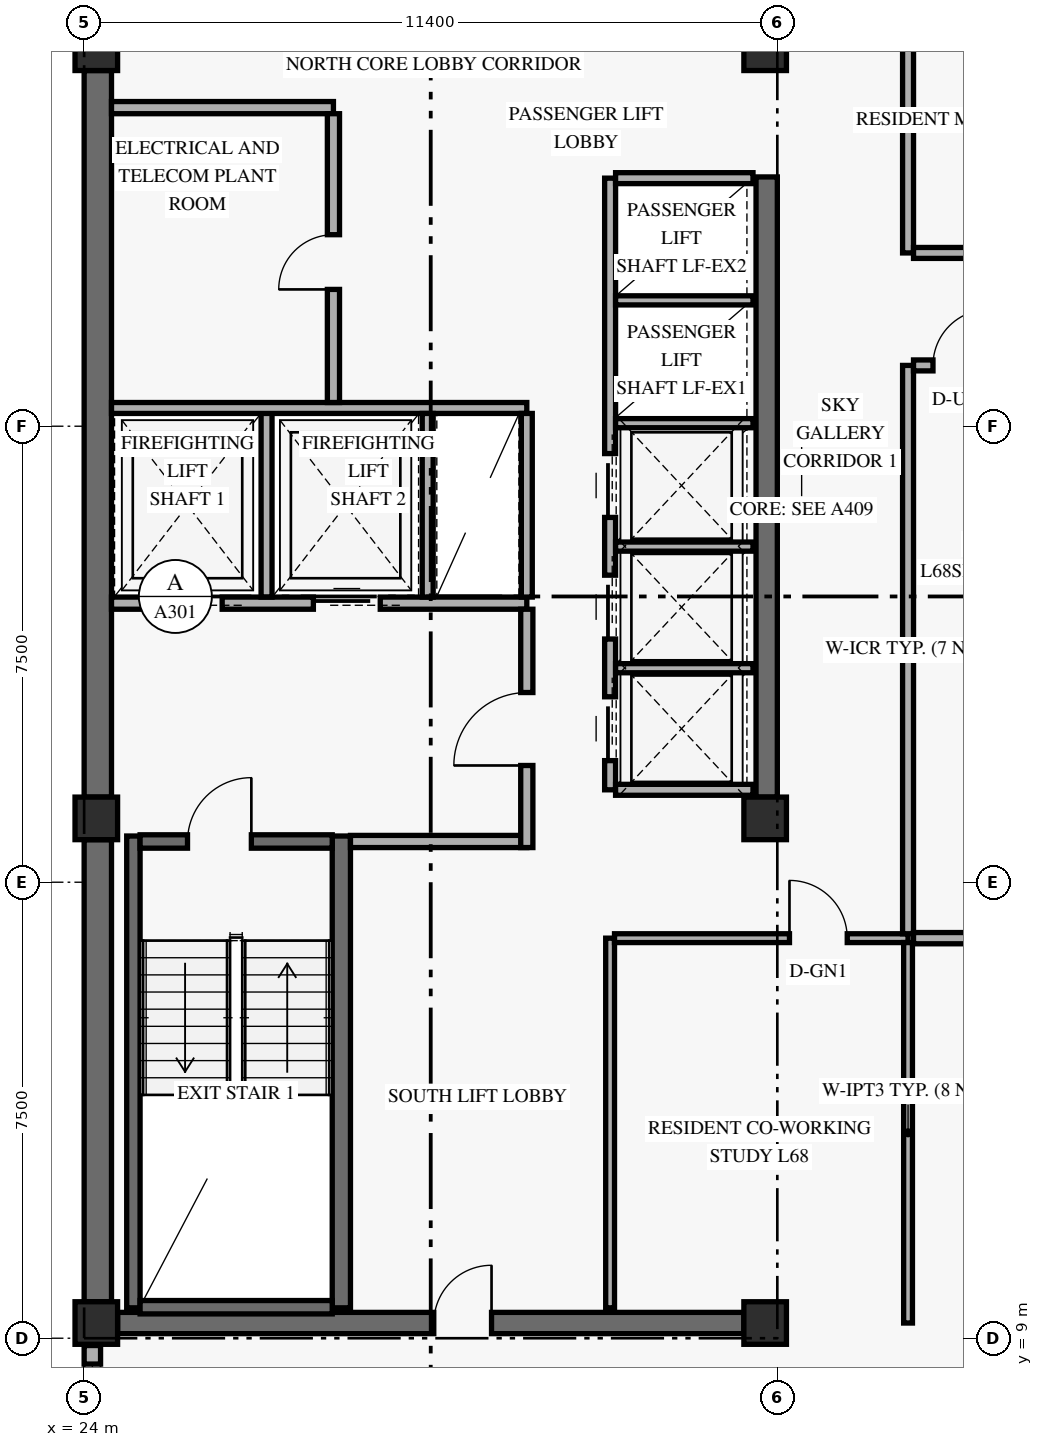
"""IFC4 building model, lengths in metres.
Left out: names, types, materials, properties, quantities, classifications, styles, units other than length and angle.
Written with IfcOpenShell. Run it as: python <this file> out.ifc"""

import sys

from ifc_helpers import new_model, si_unit, direction, frame, frame_2d, origin, origin_2d, place, context, subcontext, project, spatial, rectangle, extrude, element, fill, save


model = new_model("IFC4")
c1 = context("Model", 3, precision=1e-05, world=origin(), true_north=direction((0.0, 1.0)))
c2 = subcontext(c1, "Body", "Model", "MODEL_VIEW")
j1 = project(units=[si_unit("LENGTHUNIT", "METRE"), si_unit("PLANEANGLEUNIT", "RADIAN")], contexts=[c1])
p1 = place(None, origin())
s1 = spatial("IfcSite", under=j1, at=p1, CompositionType="ELEMENT")
p2 = place(p1, origin())
s2 = spatial("IfcBuilding", under=s1, at=p2, CompositionType="ELEMENT")
p3 = place(p2, frame((0.0, 0.0, 260.4)))
s3 = spatial("IfcBuildingStorey", under=s2, at=p3, CompositionType="ELEMENT", Elevation=260.4)
p4 = place(p3, frame((24.225, 9.6, 0.0), z_axis=(0.0, 0.0, 1.0), x_axis=(0.0, 1.0, 0.0)))
e1 = element("IfcWall", 1, at=p4, inside=s3, PredefinedType="SHEAR", context=c2, shape_type="SweptSolid", body=[
    extrude(rectangle(XDim=7.6, YDim=0.45, at=frame_2d((3.8, 0.0))), origin(), (0.0, 0.0, 1.0), 2.821),
])
p5 = place(p3, frame((24.225, 17.9, 0.0), z_axis=(0.0, 0.0, 1.0), x_axis=(0.0, 1.0, 0.0)))
e2 = element("IfcWall", 2, at=p5, inside=s3, PredefinedType="SHEAR", context=c2, shape_type="SweptSolid", body=[
    extrude(rectangle(XDim=11.95, YDim=0.45, at=frame_2d((5.975, 0.0))), origin(), (0.0, 0.0, 1.0), 2.821),
])
p6 = place(p3, frame((35.225, 17.9, 0.0), z_axis=(0.0, 0.0, 1.0), x_axis=(0.0, 1.0, 0.0)))
e3 = element("IfcWall", 3, at=p6, inside=s3, PredefinedType="SHEAR", context=c2, shape_type="SweptSolid", body=[
    extrude(rectangle(XDim=10.2, YDim=0.35, at=frame_2d((5.1, 0.0))), origin(), (0.0, 0.0, 1.0), 2.821),
])
p7 = place(p3, frame((24.55, 9.25, 0.0), z_axis=(0.0, 0.0, 1.0), x_axis=(1.0, 0.0, 0.0)))
e4 = element("IfcWall", 4, at=p7, inside=s3, PredefinedType="SHEAR", context=c2, shape_type="SweptSolid", body=[
    extrude(rectangle(XDim=10.3, YDim=0.35, at=frame_2d((5.15, 0.0))), origin(), (0.0, 0.0, 1.0), 3.36),
])
p8 = place(p7, frame((5.2, 0.0, 0.0)))
e5 = element("IfcOpeningElement", 5, at=p8, cuts=e4, PredefinedType="OPENING", context=c2, shape_type="SweptSolid", body=[
    extrude(rectangle(XDim=0.95, YDim=2.15, at=frame_2d((0.475, 1.075))), frame((0.0, 0.185, 0.0), z_axis=(0.0, -1.0, 0.0), x_axis=(1.0, 0.0, 0.0)), (0.0, 0.0, 1.0), 0.37),
])
p9 = place(p3, frame((24.81, 9.5, 0.0), z_axis=(0.0, 0.0, 1.0), x_axis=(0.0, 1.0, 0.0)))
e6 = element("IfcWall", 6, at=p9, inside=s3, PredefinedType="SHEAR", context=c2, shape_type="SweptSolid", body=[
    extrude(rectangle(XDim=7.76, YDim=0.22, at=frame_2d((3.88, 0.0))), origin(), (0.0, 0.0, 1.0), 3.36),
])
p10 = place(p3, frame((28.23, 9.5, 0.0), z_axis=(0.0, 0.0, 1.0), x_axis=(0.0, 1.0, 0.0)))
e7 = element("IfcWall", 7, at=p10, inside=s3, PredefinedType="SHEAR", context=c2, shape_type="SweptSolid", body=[
    extrude(rectangle(XDim=7.76, YDim=0.3, at=frame_2d((3.88, 0.0))), origin(), (0.0, 0.0, 1.0), 3.36),
])
p11 = place(p3, frame((24.92, 9.51, 0.0), z_axis=(0.0, 0.0, 1.0), x_axis=(1.0, 0.0, 0.0)))
e8 = element("IfcWall", 8, at=p11, inside=s3, PredefinedType="SHEAR", context=c2, shape_type="SweptSolid", body=[
    extrude(rectangle(XDim=3.16, YDim=0.22, at=frame_2d((1.58, 0.0))), origin(), (0.0, 0.0, 1.0), 3.36),
])
p12 = place(p3, frame((24.92, 17.17, 0.0), z_axis=(0.0, 0.0, 1.0), x_axis=(1.0, 0.0, 0.0)))
e9 = element("IfcWall", 9, at=p12, inside=s3, PredefinedType="SHEAR", context=c2, shape_type="SweptSolid", body=[
    extrude(rectangle(XDim=3.16, YDim=0.22, at=frame_2d((1.58, 0.0))), origin(), (0.0, 0.0, 1.0), 3.36),
])
p13 = place(p12, frame((0.78, 0.0, 0.0)))
e10 = element("IfcOpeningElement", 10, at=p13, cuts=e9, PredefinedType="OPENING", context=c2, shape_type="SweptSolid", body=[
    extrude(rectangle(XDim=1.05, YDim=2.15, at=frame_2d((0.525, 1.075))), frame((0.0, 0.12, 0.0), z_axis=(0.0, -1.0, 0.0), x_axis=(1.0, 0.0, 0.0)), (0.0, 0.0, 1.0), 0.24),
])
for number, where, z_axis, x_axis in (
    (11, (24.2, 9.25, 0.0), (0.0, 0.0, 1.0), (1.0, 0.0, 0.0)),
    (12, (24.2, 17.55, 0.0), (0.0, 0.0, 1.0), (1.0, 0.0, 0.0)),
    (13, (24.2, 30.2, 0.0), (0.0, 0.0, 1.0), (1.0, 0.0, 0.0)),
    (14, (35.2, 9.25, 0.0), (0.0, 0.0, 1.0), (1.0, 0.0, 0.0)),
    (15, (35.2, 17.55, 0.0), (0.0, 0.0, 1.0), (1.0, 0.0, 0.0)),
    (16, (35.2, 30.2, 0.0), (0.0, 0.0, 1.0), (1.0, 0.0, 0.0)),
):
    element("IfcColumn", number, at=place(p3, frame(where, z_axis=z_axis, x_axis=x_axis)), inside=s3, PredefinedType="COLUMN", context=c2, shape_type="SweptSolid", body=[
        extrude(rectangle(XDim=0.7, YDim=0.7, at=origin_2d()), origin(), (0.0, 0.0, 1.0), 3.6),
    ])
p14 = place(p3, frame((24.135, 7.32, 0.0), z_axis=(0.0, 0.0, 1.0), x_axis=(0.0, 1.0, 0.0)))
e17 = element("IfcWall", 17, at=p14, inside=s3, PredefinedType="SOLIDWALL", context=c2, shape_type="SweptSolid", body=[
    extrude(rectangle(XDim=1.56, YDim=0.27, at=frame_2d((0.78, 0.0))), origin(), (0.0, 0.0, 1.0), 2.803),
])
p15 = place(p14, frame((0.305, 0.0, 0.85)))
e18 = element("IfcOpeningElement", 18, at=p15, cuts=e17, PredefinedType="OPENING", context=c2, shape_type="SweptSolid", body=[
    extrude(rectangle(XDim=0.95, YDim=1.5, at=frame_2d((0.475, 0.75))), frame((0.0, 0.145, 0.0), z_axis=(0.0, -1.0, 0.0), x_axis=(1.0, 0.0, 0.0)), (0.0, 0.0, 1.0), 0.29),
])
p16 = place(p3, frame((24.45, 21.09, 0.0), z_axis=(0.0, 0.0, 1.0), x_axis=(1.0, 0.0, 0.0)))
e19 = element("IfcWall", 19, at=p16, inside=s3, PredefinedType="STANDARD", context=c2, shape_type="SweptSolid", body=[
    extrude(rectangle(XDim=6.83, YDim=0.2, at=frame_2d((3.415, 0.0))), origin(), (0.0, 0.0, 1.0), 3.36),
])
p17 = place(p16, frame((0.72, 0.0, 0.0)))
e20 = element("IfcOpeningElement", 20, at=p17, cuts=e19, PredefinedType="OPENING", context=c2, shape_type="SweptSolid", body=[
    extrude(rectangle(XDim=1.1, YDim=2.2, at=frame_2d((0.55, 1.1))), frame((0.0, 0.11, 0.0), z_axis=(0.0, -1.0, 0.0), x_axis=(1.0, 0.0, 0.0)), (0.0, 0.0, 1.0), 0.22),
])
p18 = place(p16, frame((3.32, 0.0, 0.0)))
e21 = element("IfcOpeningElement", 21, at=p18, cuts=e19, PredefinedType="OPENING", context=c2, shape_type="SweptSolid", body=[
    extrude(rectangle(XDim=1.1, YDim=2.2, at=frame_2d((0.55, 1.1))), frame((0.0, 0.11, 0.0), z_axis=(0.0, -1.0, 0.0), x_axis=(1.0, 0.0, 0.0)), (0.0, 0.0, 1.0), 0.22),
])
p19 = place(p3, frame((28.38, 17.17, 0.0), z_axis=(0.0, 0.0, 1.0), x_axis=(1.0, 0.0, 0.0)))
e22 = element("IfcWall", 22, at=p19, inside=s3, PredefinedType="STANDARD", context=c2, shape_type="SweptSolid", body=[
    extrude(rectangle(XDim=2.9, YDim=0.2, at=frame_2d((1.45, 0.0))), origin(), (0.0, 0.0, 1.0), 3.36),
])
p20 = place(p3, frame((31.28, 17.07, 0.0), z_axis=(0.0, 0.0, 1.0), x_axis=(0.0, 1.0, 0.0)))
e23 = element("IfcWall", 23, at=p20, inside=s3, PredefinedType="STANDARD", context=c2, shape_type="SweptSolid", body=[
    extrude(rectangle(XDim=3.92, YDim=0.2, at=frame_2d((1.96, 0.0))), origin(), (0.0, 0.0, 1.0), 2.803),
])
p21 = place(p20, frame((1.35, 0.0, 0.0)))
e24 = element("IfcOpeningElement", 24, at=p21, cuts=e23, PredefinedType="OPENING", context=c2, shape_type="SweptSolid", body=[
    extrude(rectangle(XDim=1.2, YDim=2.15, at=frame_2d((0.6, 1.075))), frame((0.0, 0.11, 0.0), z_axis=(0.0, -1.0, 0.0), x_axis=(1.0, 0.0, 0.0)), (0.0, 0.0, 1.0), 0.22),
])
p22 = place(p3, frame((27.0, 21.19, 0.0), z_axis=(0.0, 0.0, 1.0), x_axis=(0.0, 1.0, 0.0)))
e25 = element("IfcWall", 25, at=p22, inside=s3, PredefinedType="STANDARD", context=c2, shape_type="SweptSolid", body=[
    extrude(rectangle(XDim=3.11, YDim=0.18, at=frame_2d((1.555, 0.0))), origin(), (0.0, 0.0, 1.0), 3.36),
])
p23 = place(p3, frame((24.45, 24.3, 0.0), z_axis=(0.0, 0.0, 1.0), x_axis=(1.0, 0.0, 0.0)))
e26 = element("IfcWall", 26, at=p23, inside=s3, PredefinedType="STANDARD", context=c2, shape_type="SweptSolid", body=[
    extrude(rectangle(XDim=6.83, YDim=0.18, at=frame_2d((3.415, 0.0))), origin(), (0.0, 0.0, 1.0), 3.36),
])
for number, where, z_axis, x_axis in (
    (27, (29.65, 21.19, 0.0), (0.0, 0.0, 1.0), (0.0, 1.0, 0.0)),
    (28, (31.28, 21.19, 0.0), (0.0, 0.0, 1.0), (0.0, 1.0, 0.0)),
):
    element("IfcWall", number, at=place(p3, frame(where, z_axis=z_axis, x_axis=x_axis)), inside=s3, PredefinedType="STANDARD", context=c2, shape_type="SweptSolid", body=[
        extrude(rectangle(XDim=3.02, YDim=0.18, at=frame_2d((1.51, 0.0))), origin(), (0.0, 0.0, 1.0), 3.36),
    ])
p24 = place(p3, frame((24.45, 29.24, 0.0), z_axis=(0.0, 0.0, 1.0), x_axis=(1.0, 0.0, 0.0)))
e29 = element("IfcWall", 29, at=p24, inside=s3, PredefinedType="STANDARD", context=c2, shape_type="SweptSolid", body=[
    extrude(rectangle(XDim=3.65, YDim=0.2, at=frame_2d((1.825, 0.0))), origin(), (0.0, 0.0, 1.0), 3.36),
])
p25 = place(p3, frame((28.1, 24.39, 0.0), z_axis=(0.0, 0.0, 1.0), x_axis=(0.0, 1.0, 0.0)))
e30 = element("IfcWall", 30, at=p25, inside=s3, PredefinedType="STANDARD", context=c2, shape_type="SweptSolid", body=[
    extrude(rectangle(XDim=4.75, YDim=0.2, at=frame_2d((2.375, 0.0))), origin(), (0.0, 0.0, 1.0), 3.36),
])
p26 = place(p25, frame((1.86, 0.0, 0.0)))
e31 = element("IfcOpeningElement", 31, at=p26, cuts=e30, PredefinedType="OPENING", context=c2, shape_type="SweptSolid", body=[
    extrude(rectangle(XDim=0.9, YDim=2.1, at=frame_2d((0.45, 1.05))), frame((0.0, 0.11, 0.0), z_axis=(0.0, -1.0, 0.0), x_axis=(1.0, 0.0, 0.0)), (0.0, 0.0, 1.0), 0.22),
])
p27 = place(p3, frame((32.65, 18.02, 0.0), z_axis=(0.0, 0.0, 1.0), x_axis=(0.0, 1.0, 0.0)))
e32 = element("IfcWall", 32, at=p27, inside=s3, PredefinedType="STANDARD", context=c2, shape_type="SweptSolid", body=[
    extrude(rectangle(XDim=10.06, YDim=0.18, at=frame_2d((5.03, 0.0))), origin(), (0.0, 0.0, 1.0), 3.36),
])
p28 = place(p27, frame((0.48, 0.0, 0.0)))
e33 = element("IfcOpeningElement", 33, at=p28, cuts=e32, PredefinedType="OPENING", context=c2, shape_type="SweptSolid", body=[
    extrude(rectangle(XDim=1.05, YDim=2.2, at=frame_2d((0.525, 1.1))), frame((0.0, 0.1, 0.0), z_axis=(0.0, -1.0, 0.0), x_axis=(1.0, 0.0, 0.0)), (0.0, 0.0, 1.0), 0.2),
])
p29 = place(p27, frame((2.48, 0.0, 0.0)))
e34 = element("IfcOpeningElement", 34, at=p29, cuts=e32, PredefinedType="OPENING", context=c2, shape_type="SweptSolid", body=[
    extrude(rectangle(XDim=1.05, YDim=2.2, at=frame_2d((0.525, 1.1))), frame((0.0, 0.1, 0.0), z_axis=(0.0, -1.0, 0.0), x_axis=(1.0, 0.0, 0.0)), (0.0, 0.0, 1.0), 0.2),
])
p30 = place(p27, frame((4.48, 0.0, 0.0)))
e35 = element("IfcOpeningElement", 35, at=p30, cuts=e32, PredefinedType="OPENING", context=c2, shape_type="SweptSolid", body=[
    extrude(rectangle(XDim=1.05, YDim=2.2, at=frame_2d((0.525, 1.1))), frame((0.0, 0.1, 0.0), z_axis=(0.0, -1.0, 0.0), x_axis=(1.0, 0.0, 0.0)), (0.0, 0.0, 1.0), 0.2),
])
for number, where, z_axis, x_axis in (
    (36, (32.74, 18.02, 0.0), (0.0, 0.0, 1.0), (1.0, 0.0, 0.0)),
    (37, (32.74, 28.08, 0.0), (0.0, 0.0, 1.0), (1.0, 0.0, 0.0)),
):
    element("IfcWall", number, at=place(p3, frame(where, z_axis=z_axis, x_axis=x_axis)), inside=s3, PredefinedType="STANDARD", context=c2, shape_type="SweptSolid", body=[
        extrude(rectangle(XDim=2.26, YDim=0.18, at=frame_2d((1.13, 0.0))), origin(), (0.0, 0.0, 1.0), 3.36),
    ])
for number, where, z_axis, x_axis in (
    (38, (32.74, 20.02, 0.0), (0.0, 0.0, 1.0), (1.0, 0.0, 0.0)),
    (39, (32.74, 22.02, 0.0), (0.0, 0.0, 1.0), (1.0, 0.0, 0.0)),
    (40, (32.74, 24.05, 0.0), (0.0, 0.0, 1.0), (1.0, 0.0, 0.0)),
    (41, (32.74, 26.07, 0.0), (0.0, 0.0, 1.0), (1.0, 0.0, 0.0)),
):
    element("IfcWall", number, at=place(p3, frame(where, z_axis=z_axis, x_axis=x_axis)), inside=s3, PredefinedType="STANDARD", context=c2, shape_type="SweptSolid", body=[
        extrude(rectangle(XDim=2.26, YDim=0.15, at=frame_2d((1.13, 0.0))), origin(), (0.0, 0.0, 1.0), 3.36),
    ])
p31 = place(p3, frame((32.65, 9.5, 0.0), z_axis=(0.0, 0.0, 1.0), x_axis=(0.0, 1.0, 0.0)))
e42 = element("IfcWall", 42, at=p31, inside=s3, PredefinedType="PARTITIONING", context=c2, shape_type="SweptSolid", body=[
    extrude(rectangle(XDim=6.08, YDim=0.145, at=frame_2d((3.04, 0.0))), origin(), (0.0, 0.0, 1.0), 3.36),
])
p32 = place(p3, frame((32.722, 15.58, 0.0), z_axis=(0.0, 0.0, 1.0), x_axis=(1.0, 0.0, 0.0)))
e43 = element("IfcWall", 43, at=p32, inside=s3, PredefinedType="PARTITIONING", context=c2, shape_type="SweptSolid", body=[
    extrude(rectangle(XDim=4.828, YDim=0.145, at=frame_2d((2.414, 0.0))), origin(), (0.0, 0.0, 1.0), 2.803),
])
p33 = place(p32, frame((2.877, 0.0, 0.0)))
e44 = element("IfcOpeningElement", 44, at=p33, cuts=e43, PredefinedType="OPENING", context=c2, shape_type="SweptSolid", body=[
    extrude(rectangle(XDim=0.95, YDim=2.15, at=frame_2d((0.475, 1.075))), frame((0.0, 0.083, 0.0), z_axis=(0.0, -1.0, 0.0), x_axis=(1.0, 0.0, 0.0)), (0.0, 0.0, 1.0), 0.165),
])
p34 = place(p3, frame((37.55, 9.25, 0.0), z_axis=(0.0, 0.0, 1.0), x_axis=(0.0, 1.0, 0.0)))
e45 = element("IfcWall", 45, at=p34, inside=s3, PredefinedType="PARTITIONING", context=c2, shape_type="SweptSolid", body=[
    extrude(rectangle(XDim=6.258, YDim=0.145, at=frame_2d((3.129, 0.0))), origin(), (0.0, 0.0, 1.0), 2.803),
])
p35 = place(p3, frame((37.55, 15.653, 0.0), z_axis=(0.0, 0.0, 1.0), x_axis=(0.0, 1.0, 0.0)))
e46 = element("IfcWall", 46, at=p35, inside=s3, PredefinedType="STANDARD", context=c2, shape_type="SweptSolid", body=[
    extrude(rectangle(XDim=9.347, YDim=0.18, at=frame_2d((4.674, 0.0))), origin(), (0.0, 0.0, 1.0), 2.803),
])
p36 = place(p3, frame((37.55, 26.85, 0.0), z_axis=(0.0, 0.0, 1.0), x_axis=(0.0, 1.0, 0.0)))
e47 = element("IfcWall", 47, at=p36, inside=s3, PredefinedType="STANDARD", context=c2, shape_type="SweptSolid", body=[
    extrude(rectangle(XDim=4.427, YDim=0.18, at=frame_2d((2.214, 0.0))), origin(), (0.0, 0.0, 1.0), 2.803),
])
p37 = place(p3, frame((37.64, 25.0, 0.0), z_axis=(0.0, 0.0, 1.0), x_axis=(1.0, 0.0, 0.0)))
e48 = element("IfcWall", 48, at=p37, inside=s3, PredefinedType="STANDARD", context=c2, shape_type="SweptSolid", body=[
    extrude(rectangle(XDim=16.87, YDim=0.18, at=frame_2d((8.435, 0.0))), origin(), (0.0, 0.0, 1.0), 2.803),
])
p38 = place(p37, frame((0.32, 0.0, 0.0)))
e49 = element("IfcOpeningElement", 49, at=p38, cuts=e48, PredefinedType="OPENING", context=c2, shape_type="SweptSolid", body=[
    extrude(rectangle(XDim=0.92, YDim=2.15, at=frame_2d((0.46, 1.075))), frame((0.0, 0.1, 0.0), z_axis=(0.0, -1.0, 0.0), x_axis=(1.0, 0.0, 0.0)), (0.0, 0.0, 1.0), 0.2),
])
p39 = place(p3, frame((37.64, 26.85, 0.0), z_axis=(0.0, 0.0, 1.0), x_axis=(1.0, 0.0, 0.0)))
e50 = element("IfcWall", 50, at=p39, inside=s3, PredefinedType="STANDARD", context=c2, shape_type="SweptSolid", body=[
    extrude(rectangle(XDim=16.87, YDim=0.18, at=frame_2d((8.435, 0.0))), origin(), (0.0, 0.0, 1.0), 2.803),
])
p40 = place(p39, frame((7.975, 0.0, 0.0)))
e51 = element("IfcOpeningElement", 51, at=p40, cuts=e50, PredefinedType="OPENING", context=c2, shape_type="SweptSolid", body=[
    extrude(rectangle(XDim=0.92, YDim=2.15, at=frame_2d((0.46, 1.075))), frame((0.0, 0.1, 0.0), z_axis=(0.0, -1.0, 0.0), x_axis=(1.0, 0.0, 0.0)), (0.0, 0.0, 1.0), 0.2),
])
p41 = place(p3, frame((37.64, 15.58, 0.0), z_axis=(0.0, 0.0, 1.0), x_axis=(1.0, 0.0, 0.0)))
e52 = element("IfcWall", 52, at=p41, inside=s3, PredefinedType="PARTITIONING", context=c2, shape_type="SweptSolid", body=[
    extrude(rectangle(XDim=16.87, YDim=0.185, at=frame_2d((8.435, 0.0))), origin(), (0.0, 0.0, 1.0), 2.803),
])
p42 = place(p15, origin())
e53 = element("IfcWindow", 53, at=p42, inside=s3, PartitioningType="SINGLE_PANEL", PredefinedType="WINDOW", context=c2, shape_type="SweptSolid", body=[
    extrude(rectangle(XDim=0.95, YDim=1.5, at=frame_2d((0.475, 0.75))), frame((0.0, 0.03, 0.0), z_axis=(0.0, -1.0, 0.0), x_axis=(1.0, 0.0, 0.0)), (0.0, 0.0, 1.0), 0.06),
])
fill(e18, e53)
p43 = place(p13, frame((1.05, 0.0, 0.0), z_axis=(0.0, 0.0, 1.0), x_axis=(-1.0, 0.0, 0.0)))
e54 = element("IfcDoor", 54, at=p43, inside=s3, OperationType="SINGLE_SWING_LEFT", PredefinedType="DOOR", context=c2, shape_type="SweptSolid", body=[
    extrude(rectangle(XDim=1.05, YDim=2.15, at=frame_2d((0.525, 1.075))), frame((0.0, 0.025, 0.0), z_axis=(0.0, -1.0, 0.0), x_axis=(1.0, 0.0, 0.0)), (0.0, 0.0, 1.0), 0.05),
])
fill(e10, e54)
p44 = place(p17, origin())
e55 = element("IfcDoor", 55, at=p44, inside=s3, OperationType="SLIDING_TO_LEFT", PredefinedType="DOOR", context=c2, shape_type="SweptSolid", body=[
    extrude(rectangle(XDim=1.1, YDim=2.2, at=frame_2d((0.55, 1.1))), frame((0.0, 0.025, 0.0), z_axis=(0.0, -1.0, 0.0), x_axis=(1.0, 0.0, 0.0)), (0.0, 0.0, 1.0), 0.05),
])
fill(e20, e55)
p45 = place(p18, origin())
e56 = element("IfcDoor", 56, at=p45, inside=s3, OperationType="SLIDING_TO_LEFT", PredefinedType="DOOR", context=c2, shape_type="SweptSolid", body=[
    extrude(rectangle(XDim=1.1, YDim=2.2, at=frame_2d((0.55, 1.1))), frame((0.0, 0.025, 0.0), z_axis=(0.0, -1.0, 0.0), x_axis=(1.0, 0.0, 0.0)), (0.0, 0.0, 1.0), 0.05),
])
fill(e21, e56)
p46 = place(p21, origin())
e57 = element("IfcDoor", 57, at=p46, inside=s3, OperationType="SINGLE_SWING_LEFT", PredefinedType="DOOR", context=c2, shape_type="SweptSolid", body=[
    extrude(rectangle(XDim=1.2, YDim=2.15, at=frame_2d((0.6, 1.075))), frame((0.0, 0.025, 0.0), z_axis=(0.0, -1.0, 0.0), x_axis=(1.0, 0.0, 0.0)), (0.0, 0.0, 1.0), 0.05),
])
fill(e24, e57)
p47 = place(p26, origin())
e58 = element("IfcDoor", 58, at=p47, inside=s3, OperationType="SINGLE_SWING_LEFT", PredefinedType="DOOR", context=c2, shape_type="SweptSolid", body=[
    extrude(rectangle(XDim=0.9, YDim=2.1, at=frame_2d((0.45, 1.05))), frame((0.0, 0.025, 0.0), z_axis=(0.0, -1.0, 0.0), x_axis=(1.0, 0.0, 0.0)), (0.0, 0.0, 1.0), 0.05),
])
fill(e31, e58)
p48 = place(p28, origin())
e59 = element("IfcDoor", 59, at=p48, inside=s3, OperationType="SLIDING_TO_LEFT", PredefinedType="DOOR", context=c2, shape_type="SweptSolid", body=[
    extrude(rectangle(XDim=1.05, YDim=2.2, at=frame_2d((0.525, 1.1))), frame((0.0, 0.025, 0.0), z_axis=(0.0, -1.0, 0.0), x_axis=(1.0, 0.0, 0.0)), (0.0, 0.0, 1.0), 0.05),
])
fill(e33, e59)
p49 = place(p29, origin())
e60 = element("IfcDoor", 60, at=p49, inside=s3, OperationType="SLIDING_TO_LEFT", PredefinedType="DOOR", context=c2, shape_type="SweptSolid", body=[
    extrude(rectangle(XDim=1.05, YDim=2.2, at=frame_2d((0.525, 1.1))), frame((0.0, 0.025, 0.0), z_axis=(0.0, -1.0, 0.0), x_axis=(1.0, 0.0, 0.0)), (0.0, 0.0, 1.0), 0.05),
])
fill(e34, e60)
p50 = place(p30, origin())
e61 = element("IfcDoor", 61, at=p50, inside=s3, OperationType="SLIDING_TO_LEFT", PredefinedType="DOOR", context=c2, shape_type="SweptSolid", body=[
    extrude(rectangle(XDim=1.05, YDim=2.2, at=frame_2d((0.525, 1.1))), frame((0.0, 0.025, 0.0), z_axis=(0.0, -1.0, 0.0), x_axis=(1.0, 0.0, 0.0)), (0.0, 0.0, 1.0), 0.05),
])
fill(e35, e61)
p51 = place(p33, origin())
e62 = element("IfcDoor", 62, at=p51, inside=s3, OperationType="SINGLE_SWING_LEFT", PredefinedType="DOOR", context=c2, shape_type="SweptSolid", body=[
    extrude(rectangle(XDim=0.95, YDim=2.15, at=frame_2d((0.475, 1.075))), frame((0.0, 0.025, 0.0), z_axis=(0.0, -1.0, 0.0), x_axis=(1.0, 0.0, 0.0)), (0.0, 0.0, 1.0), 0.05),
])
fill(e44, e62)
p52 = place(p8, frame((0.95, 0.0, 0.0), z_axis=(0.0, 0.0, 1.0), x_axis=(-1.0, 0.0, 0.0)))
e63 = element("IfcDoor", 63, at=p52, inside=s3, OperationType="SINGLE_SWING_LEFT", PredefinedType="DOOR", context=c2, shape_type="SweptSolid", body=[
    extrude(rectangle(XDim=0.95, YDim=2.15, at=frame_2d((0.475, 1.075))), frame((0.0, 0.025, 0.0), z_axis=(0.0, -1.0, 0.0), x_axis=(1.0, 0.0, 0.0)), (0.0, 0.0, 1.0), 0.05),
])
fill(e5, e63)
p53 = place(p38, origin())
e64 = element("IfcDoor", 64, at=p53, inside=s3, OperationType="SINGLE_SWING_RIGHT", PredefinedType="DOOR", context=c2, shape_type="SweptSolid", body=[
    extrude(rectangle(XDim=0.92, YDim=2.15, at=frame_2d((0.46, 1.075))), frame((0.0, 0.025, 0.0), z_axis=(0.0, -1.0, 0.0), x_axis=(1.0, 0.0, 0.0)), (0.0, 0.0, 1.0), 0.05),
])
fill(e49, e64)
save(model, sys.argv[1])
